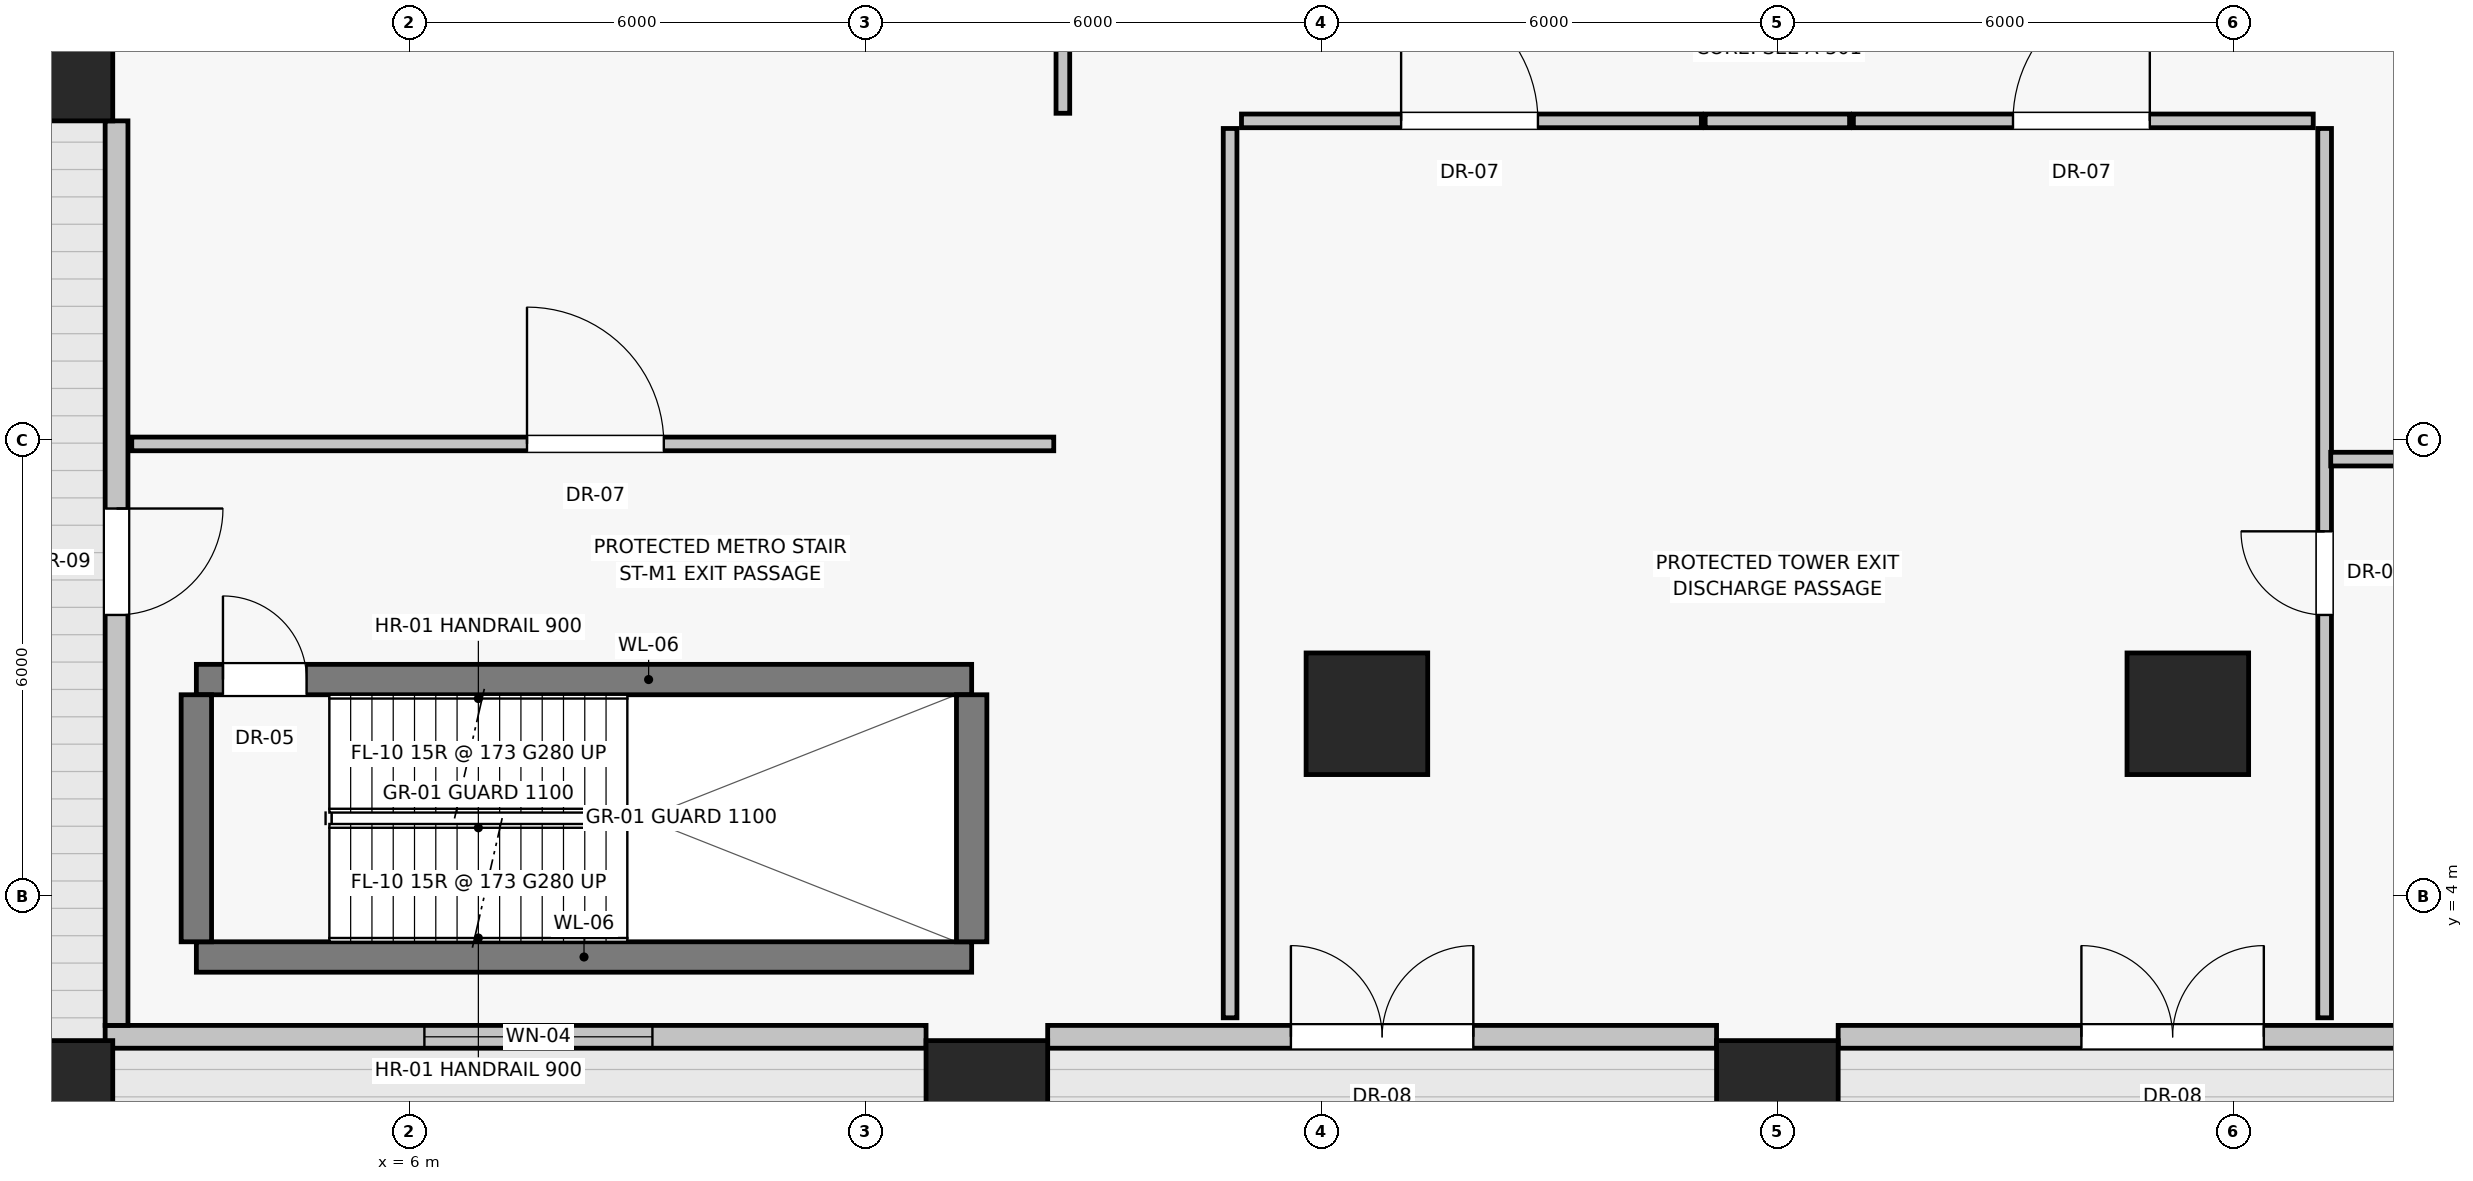
"""IFC4 building model, lengths in metres.
Left out: names, types, materials, properties, quantities, classifications, styles, units other than length and angle.
Written with IfcOpenShell. Run it as: python <this file> out.ifc"""

import sys

from ifc_helpers import new_model, si_unit, direction, frame, frame_2d, origin, origin_2d, place, context, subcontext, project, spatial, rectangle, extrude, source, transform, mapped, element, fill, save


model = new_model("IFC4")
c1 = context("Model", 3, precision=1e-05, world=origin(), true_north=direction((0.0, 1.0)))
c2 = subcontext(c1, "Body", "Model", "MODEL_VIEW")
j1 = project(units=[si_unit("LENGTHUNIT", "METRE"), si_unit("PLANEANGLEUNIT", "RADIAN")], contexts=[c1])
p1 = place(None, origin())
s1 = spatial("IfcSite", under=j1, at=p1, CompositionType="ELEMENT")
p2 = place(p1, origin())
s2 = spatial("IfcBuilding", under=s1, at=p2, CompositionType="ELEMENT")
p3 = place(p2, origin())
s3 = spatial("IfcBuildingStorey", under=s2, at=p3, CompositionType="ELEMENT", Elevation=0.0)
for number, where, z_axis, x_axis in (
    (1, (1.3, 1.3, 0.0), (0.0, 0.0, 1.0), (1.0, 0.0, 0.0)),
    (2, (13.6, 1.3, 0.0), (0.0, 0.0, 1.0), (1.0, 0.0, 0.0)),
    (3, (24.0, 1.3, 0.0), (0.0, 0.0, 1.0), (1.0, 0.0, 0.0)),
    (4, (1.3, 15.0, 0.0), (0.0, 0.0, 1.0), (1.0, 0.0, 0.0)),
    (5, (18.6, 6.4, 0.0), (0.0, 0.0, 1.0), (1.0, 0.0, 0.0)),
    (6, (29.4, 6.4, 0.0), (0.0, 0.0, 1.0), (1.0, 0.0, 0.0)),
):
    element("IfcColumn", number, at=place(p3, frame(where, z_axis=z_axis, x_axis=x_axis)), inside=s3, PredefinedType="COLUMN", context=c2, shape_type="SweptSolid", body=[
        extrude(rectangle(XDim=1.6, YDim=1.6, at=origin_2d()), origin(), (0.0, 0.0, 1.0), 5.2),
    ])
p4 = place(p3, frame((2.0, 2.15, 0.0), z_axis=(0.0, 0.0, 1.0), x_axis=(1.0, 0.0, 0.0)))
e7 = element("IfcWall", 7, at=p4, inside=s3, PredefinedType="SOLIDWALL", context=c2, shape_type="SweptSolid", body=[
    extrude(rectangle(XDim=10.8, YDim=0.3, at=frame_2d((5.4, 0.0))), origin(), (0.0, 0.0, 1.0), 3.8),
])
p5 = place(p4, frame((4.2, 0.0, 0.9)))
e8 = element("IfcOpeningElement", 8, at=p5, cuts=e7, PredefinedType="OPENING", context=c2, shape_type="SweptSolid", body=[
    extrude(rectangle(XDim=3.0, YDim=2.4, at=frame_2d((1.5, 1.2))), frame((0.0, 0.16, 0.0), z_axis=(0.0, -1.0, 0.0), x_axis=(1.0, 0.0, 0.0)), (0.0, 0.0, 1.0), 0.32),
])
p6 = place(p3, frame((14.4, 2.15, 0.0), z_axis=(0.0, 0.0, 1.0), x_axis=(1.0, 0.0, 0.0)))
e9 = element("IfcWall", 9, at=p6, inside=s3, PredefinedType="SOLIDWALL", context=c2, shape_type="SweptSolid", body=[
    extrude(rectangle(XDim=8.8, YDim=0.3, at=frame_2d((4.4, 0.0))), origin(), (0.0, 0.0, 1.0), 3.8),
])
p7 = place(p6, frame((3.2, 0.0, 0.0)))
e10 = element("IfcOpeningElement", 10, at=p7, cuts=e9, PredefinedType="OPENING", context=c2, shape_type="SweptSolid", body=[
    extrude(rectangle(XDim=2.4, YDim=2.5, at=frame_2d((1.2, 1.25))), frame((0.0, 0.16, 0.0), z_axis=(0.0, -1.0, 0.0), x_axis=(1.0, 0.0, 0.0)), (0.0, 0.0, 1.0), 0.32),
])
p8 = place(p3, frame((24.8, 2.15, 0.0), z_axis=(0.0, 0.0, 1.0), x_axis=(1.0, 0.0, 0.0)))
e11 = element("IfcWall", 11, at=p8, inside=s3, PredefinedType="SOLIDWALL", context=c2, shape_type="SweptSolid", body=[
    extrude(rectangle(XDim=8.8, YDim=0.3, at=frame_2d((4.4, 0.0))), origin(), (0.0, 0.0, 1.0), 3.8),
])
p9 = place(p8, frame((3.2, 0.0, 0.0)))
e12 = element("IfcOpeningElement", 12, at=p9, cuts=e11, PredefinedType="OPENING", context=c2, shape_type="SweptSolid", body=[
    extrude(rectangle(XDim=2.4, YDim=2.5, at=frame_2d((1.2, 1.25))), frame((0.0, 0.16, 0.0), z_axis=(0.0, -1.0, 0.0), x_axis=(1.0, 0.0, 0.0)), (0.0, 0.0, 1.0), 0.32),
])
p10 = place(p3, frame((2.15, 14.2, 0.0), z_axis=(0.0, 0.0, 1.0), x_axis=(0.0, -1.0, 0.0)))
e13 = element("IfcWall", 13, at=p10, inside=s3, PredefinedType="SOLIDWALL", context=c2, shape_type="SweptSolid", body=[
    extrude(rectangle(XDim=11.9, YDim=0.3, at=frame_2d((5.95, 0.0))), origin(), (0.0, 0.0, 1.0), 3.8),
])
p11 = place(p10, frame((5.1, 0.0, 0.0)))
e14 = element("IfcOpeningElement", 14, at=p11, cuts=e13, PredefinedType="OPENING", context=c2, shape_type="SweptSolid", body=[
    extrude(rectangle(XDim=1.4, YDim=2.3, at=frame_2d((0.7, 1.15))), frame((0.0, 0.16, 0.0), z_axis=(0.0, -1.0, 0.0), x_axis=(1.0, 0.0, 0.0)), (0.0, 0.0, 1.0), 0.32),
])
p12 = place(p3, frame((3.2, 3.2, 0.0), z_axis=(0.0, 0.0, 1.0), x_axis=(1.0, 0.0, 0.0)))
e15 = element("IfcWall", 15, at=p12, inside=s3, PredefinedType="SHEAR", context=c2, shape_type="SweptSolid", body=[
    extrude(rectangle(XDim=10.2, YDim=0.4, at=frame_2d((5.1, 0.0))), origin(), (0.0, 0.0, 1.0), 4.9),
])
p13 = place(p3, frame((3.2, 6.85, 0.0), z_axis=(0.0, 0.0, 1.0), x_axis=(1.0, 0.0, 0.0)))
e16 = element("IfcWall", 16, at=p13, inside=s3, PredefinedType="SHEAR", context=c2, shape_type="SweptSolid", body=[
    extrude(rectangle(XDim=10.2, YDim=0.4, at=frame_2d((5.1, 0.0))), origin(), (0.0, 0.0, 1.0), 4.9),
])
p14 = place(p13, frame((0.35, 0.0, 0.0)))
e17 = element("IfcOpeningElement", 17, at=p14, cuts=e16, PredefinedType="OPENING", context=c2, shape_type="SweptSolid", body=[
    extrude(rectangle(XDim=1.1, YDim=2.03, at=frame_2d((0.55, 1.015))), frame((0.0, 0.21, 0.0), z_axis=(0.0, -1.0, 0.0), x_axis=(1.0, 0.0, 0.0)), (0.0, 0.0, 1.0), 0.42),
])
for number, where, z_axis, x_axis in (
    (18, (3.2, 3.4, 0.0), (0.0, 0.0, 1.0), (0.0, 1.0, 0.0)),
    (19, (13.4, 3.4, 0.0), (0.0, 0.0, 1.0), (0.0, 1.0, 0.0)),
):
    element("IfcWall", number, at=place(p3, frame(where, z_axis=z_axis, x_axis=x_axis)), inside=s3, PredefinedType="SHEAR", context=c2, shape_type="SweptSolid", body=[
        extrude(rectangle(XDim=3.25, YDim=0.4, at=frame_2d((1.625, 0.0))), origin(), (0.0, 0.0, 1.0), 4.9),
    ])
p15 = place(p3, frame((2.35, 9.95, 0.0), z_axis=(0.0, 0.0, 1.0), x_axis=(1.0, 0.0, 0.0)))
e20 = element("IfcWall", 20, at=p15, inside=s3, PredefinedType="PARTITIONING", context=c2, shape_type="SweptSolid", body=[
    extrude(rectangle(XDim=12.13, YDim=0.18, at=frame_2d((6.065, 0.0))), origin(), (0.0, 0.0, 1.0), 4.9),
])
p16 = place(p15, frame((5.2, 0.0, 0.0)))
e21 = element("IfcOpeningElement", 21, at=p16, cuts=e20, PredefinedType="OPENING", context=c2, shape_type="SweptSolid", body=[
    extrude(rectangle(XDim=1.8, YDim=2.25, at=frame_2d((0.9, 1.125))), frame((0.0, 0.1, 0.0), z_axis=(0.0, -1.0, 0.0), x_axis=(1.0, 0.0, 0.0)), (0.0, 0.0, 1.0), 0.2),
])
p17 = place(p3, frame((16.95, 14.2, 0.0), z_axis=(0.0, 0.0, 1.0), x_axis=(1.0, 0.0, 0.0)))
e22 = element("IfcWall", 22, at=p17, inside=s3, PredefinedType="PARTITIONING", context=c2, shape_type="SweptSolid", body=[
    extrude(rectangle(XDim=6.05, YDim=0.18, at=frame_2d((3.025, 0.0))), origin(), (0.0, 0.0, 1.0), 4.9),
])
p18 = place(p17, frame((2.1, 0.0, 0.0)))
e23 = element("IfcOpeningElement", 23, at=p18, cuts=e22, PredefinedType="OPENING", context=c2, shape_type="SweptSolid", body=[
    extrude(rectangle(XDim=1.8, YDim=2.25, at=frame_2d((0.9, 1.125))), frame((0.0, 0.1, 0.0), z_axis=(0.0, -1.0, 0.0), x_axis=(1.0, 0.0, 0.0)), (0.0, 0.0, 1.0), 0.2),
])
p19 = place(p3, frame((25.0, 14.2, 0.0), z_axis=(0.0, 0.0, 1.0), x_axis=(1.0, 0.0, 0.0)))
e24 = element("IfcWall", 24, at=p19, inside=s3, PredefinedType="PARTITIONING", context=c2, shape_type="SweptSolid", body=[
    extrude(rectangle(XDim=6.05, YDim=0.18, at=frame_2d((3.025, 0.0))), origin(), (0.0, 0.0, 1.0), 4.9),
])
p20 = place(p19, frame((2.1, 0.0, 0.0)))
e25 = element("IfcOpeningElement", 25, at=p20, cuts=e24, PredefinedType="OPENING", context=c2, shape_type="SweptSolid", body=[
    extrude(rectangle(XDim=1.8, YDim=2.25, at=frame_2d((0.9, 1.125))), frame((0.0, 0.1, 0.0), z_axis=(0.0, -1.0, 0.0), x_axis=(1.0, 0.0, 0.0)), (0.0, 0.0, 1.0), 0.2),
])
p21 = place(p3, frame((23.05, 14.2, 0.0), z_axis=(0.0, 0.0, 1.0), x_axis=(1.0, 0.0, 0.0)))
e26 = element("IfcWall", 26, at=p21, inside=s3, PredefinedType="PARTITIONING", context=c2, shape_type="SweptSolid", body=[
    extrude(rectangle(XDim=1.9, YDim=0.18, at=frame_2d((0.95, 0.0))), origin(), (0.0, 0.0, 1.0), 4.9),
])
p22 = place(p3, frame((14.6, 14.3, 0.0), z_axis=(0.0, 0.0, 1.0), x_axis=(0.0, 1.0, 0.0)))
e27 = element("IfcWall", 27, at=p22, inside=s3, PredefinedType="PARTITIONING", context=c2, shape_type="SweptSolid", body=[
    extrude(rectangle(XDim=19.2, YDim=0.18, at=frame_2d((9.6, 0.0))), origin(), (0.0, 0.0, 1.0), 4.9),
])
p23 = place(p22, frame((8.5, 0.0, 0.0)))
e28 = element("IfcOpeningElement", 28, at=p23, cuts=e27, PredefinedType="OPENING", context=c2, shape_type="SweptSolid", body=[
    extrude(rectangle(XDim=1.8, YDim=2.25, at=frame_2d((0.9, 1.125))), frame((0.0, 0.1, 0.0), z_axis=(0.0, -1.0, 0.0), x_axis=(1.0, 0.0, 0.0)), (0.0, 0.0, 1.0), 0.2),
])
p24 = place(p3, frame((16.8, 2.4, 0.0), z_axis=(0.0, 0.0, 1.0), x_axis=(0.0, 1.0, 0.0)))
e29 = element("IfcWall", 29, at=p24, inside=s3, PredefinedType="PARTITIONING", context=c2, shape_type="SweptSolid", body=[
    extrude(rectangle(XDim=11.7, YDim=0.18, at=frame_2d((5.85, 0.0))), origin(), (0.0, 0.0, 1.0), 4.9),
])
p25 = place(p3, frame((31.2, 2.4, 0.0), z_axis=(0.0, 0.0, 1.0), x_axis=(0.0, 1.0, 0.0)))
e30 = element("IfcWall", 30, at=p25, inside=s3, PredefinedType="PARTITIONING", context=c2, shape_type="SweptSolid", body=[
    extrude(rectangle(XDim=11.7, YDim=0.18, at=frame_2d((5.85, 0.0))), origin(), (0.0, 0.0, 1.0), 4.9),
])
p26 = place(p25, frame((5.3, 0.0, 0.0)))
e31 = element("IfcOpeningElement", 31, at=p26, cuts=e30, PredefinedType="OPENING", context=c2, shape_type="SweptSolid", body=[
    extrude(rectangle(XDim=1.1, YDim=2.03, at=frame_2d((0.55, 1.015))), frame((0.0, 0.1, 0.0), z_axis=(0.0, -1.0, 0.0), x_axis=(1.0, 0.0, 0.0)), (0.0, 0.0, 1.0), 0.2),
])
p27 = place(p3, frame((31.28, 9.75, 0.0), z_axis=(0.0, 0.0, 1.0), x_axis=(1.0, 0.0, 0.0)))
e32 = element("IfcWall", 32, at=p27, inside=s3, PredefinedType="PARTITIONING", context=c2, shape_type="SweptSolid", body=[
    extrude(rectangle(XDim=6.67, YDim=0.18, at=frame_2d((3.335, 0.0))), origin(), (0.0, 0.0, 1.0), 4.9),
])
m1 = source(origin(), c2, "Body", "SweptSolid", [
    extrude(rectangle(XDim=3.0, YDim=2.4, at=frame_2d((1.5, 1.2))), frame((0.0, 0.03, 0.0), z_axis=(0.0, -1.0, 0.0), x_axis=(1.0, 0.0, 0.0)), (0.0, 0.0, 1.0), 0.06),
])
p28 = place(p5, origin())
e33 = element("IfcWindow", 33, at=p28, inside=s3, PartitioningType="DOUBLE_PANEL_VERTICAL", PredefinedType="WINDOW", context=c2, shape_type="MappedRepresentation", body=[
    mapped(m1, transform((0.0, 0.0, 0.0), scale=1.0)),
])
fill(e8, e33)
m2 = source(origin(), c2, "Body", "SweptSolid", [
    extrude(rectangle(XDim=2.4, YDim=2.5, at=frame_2d((1.2, 1.25))), frame((0.0, 0.025, 0.0), z_axis=(0.0, -1.0, 0.0), x_axis=(1.0, 0.0, 0.0)), (0.0, 0.0, 1.0), 0.05),
])
p29 = place(p7, frame((2.4, 0.0, 0.0), z_axis=(0.0, 0.0, 1.0), x_axis=(-1.0, 0.0, 0.0)))
e34 = element("IfcDoor", 34, at=p29, inside=s3, OperationType="DOUBLE_SWING_LEFT", PredefinedType="DOOR", context=c2, shape_type="MappedRepresentation", body=[
    mapped(m2, transform((0.0, 0.0, 0.0), scale=1.0)),
])
fill(e10, e34)
p30 = place(p9, frame((2.4, 0.0, 0.0), z_axis=(0.0, 0.0, 1.0), x_axis=(-1.0, 0.0, 0.0)))
e35 = element("IfcDoor", 35, at=p30, inside=s3, OperationType="DOUBLE_SWING_LEFT", PredefinedType="DOOR", context=c2, shape_type="MappedRepresentation", body=[
    mapped(m2, transform((0.0, 0.0, 0.0), scale=1.0)),
])
fill(e12, e35)
m3 = source(origin(), c2, "Body", "SweptSolid", [
    extrude(rectangle(XDim=1.4, YDim=2.3, at=frame_2d((0.7, 1.15))), frame((0.0, 0.025, 0.0), z_axis=(0.0, -1.0, 0.0), x_axis=(1.0, 0.0, 0.0)), (0.0, 0.0, 1.0), 0.05),
])
p31 = place(p11, frame((1.4, 0.0, 0.0), z_axis=(0.0, 0.0, 1.0), x_axis=(-1.0, 0.0, 0.0)))
e36 = element("IfcDoor", 36, at=p31, inside=s3, OperationType="SINGLE_SWING_LEFT", PredefinedType="DOOR", context=c2, shape_type="MappedRepresentation", body=[
    mapped(m3, transform((0.0, 0.0, 0.0), scale=1.0)),
])
fill(e14, e36)
m4 = source(origin(), c2, "Body", "SweptSolid", [
    extrude(rectangle(XDim=1.1, YDim=2.03, at=frame_2d((0.55, 1.015))), frame((0.0, 0.025, 0.0), z_axis=(0.0, -1.0, 0.0), x_axis=(1.0, 0.0, 0.0)), (0.0, 0.0, 1.0), 0.05),
])
p32 = place(p14, origin())
e37 = element("IfcDoor", 37, at=p32, inside=s3, OperationType="SINGLE_SWING_LEFT", PredefinedType="DOOR", context=c2, shape_type="MappedRepresentation", body=[
    mapped(m4, transform((0.0, 0.0, 0.0), scale=1.0)),
])
fill(e17, e37)
m5 = source(origin(), c2, "Body", "SweptSolid", [
    extrude(rectangle(XDim=1.8, YDim=2.25, at=frame_2d((0.9, 1.125))), frame((0.0, 0.025, 0.0), z_axis=(0.0, -1.0, 0.0), x_axis=(1.0, 0.0, 0.0)), (0.0, 0.0, 1.0), 0.05),
])
p33 = place(p16, origin())
e38 = element("IfcDoor", 38, at=p33, inside=s3, OperationType="SINGLE_SWING_LEFT", PredefinedType="DOOR", context=c2, shape_type="MappedRepresentation", body=[
    mapped(m5, transform((0.0, 0.0, 0.0), scale=1.0)),
])
fill(e21, e38)
p34 = place(p18, origin())
e39 = element("IfcDoor", 39, at=p34, inside=s3, OperationType="SINGLE_SWING_LEFT", PredefinedType="DOOR", context=c2, shape_type="MappedRepresentation", body=[
    mapped(m5, transform((0.0, 0.0, 0.0), scale=1.0)),
])
fill(e23, e39)
p35 = place(p20, origin())
e40 = element("IfcDoor", 40, at=p35, inside=s3, OperationType="SINGLE_SWING_RIGHT", PredefinedType="DOOR", context=c2, shape_type="MappedRepresentation", body=[
    mapped(m5, transform((0.0, 0.0, 0.0), scale=1.0)),
])
fill(e25, e40)
p36 = place(p26, origin())
e41 = element("IfcDoor", 41, at=p36, inside=s3, OperationType="SINGLE_SWING_RIGHT", PredefinedType="DOOR", context=c2, shape_type="MappedRepresentation", body=[
    mapped(m4, transform((0.0, 0.0, 0.0), scale=1.0)),
])
fill(e31, e41)
save(model, sys.argv[1])
